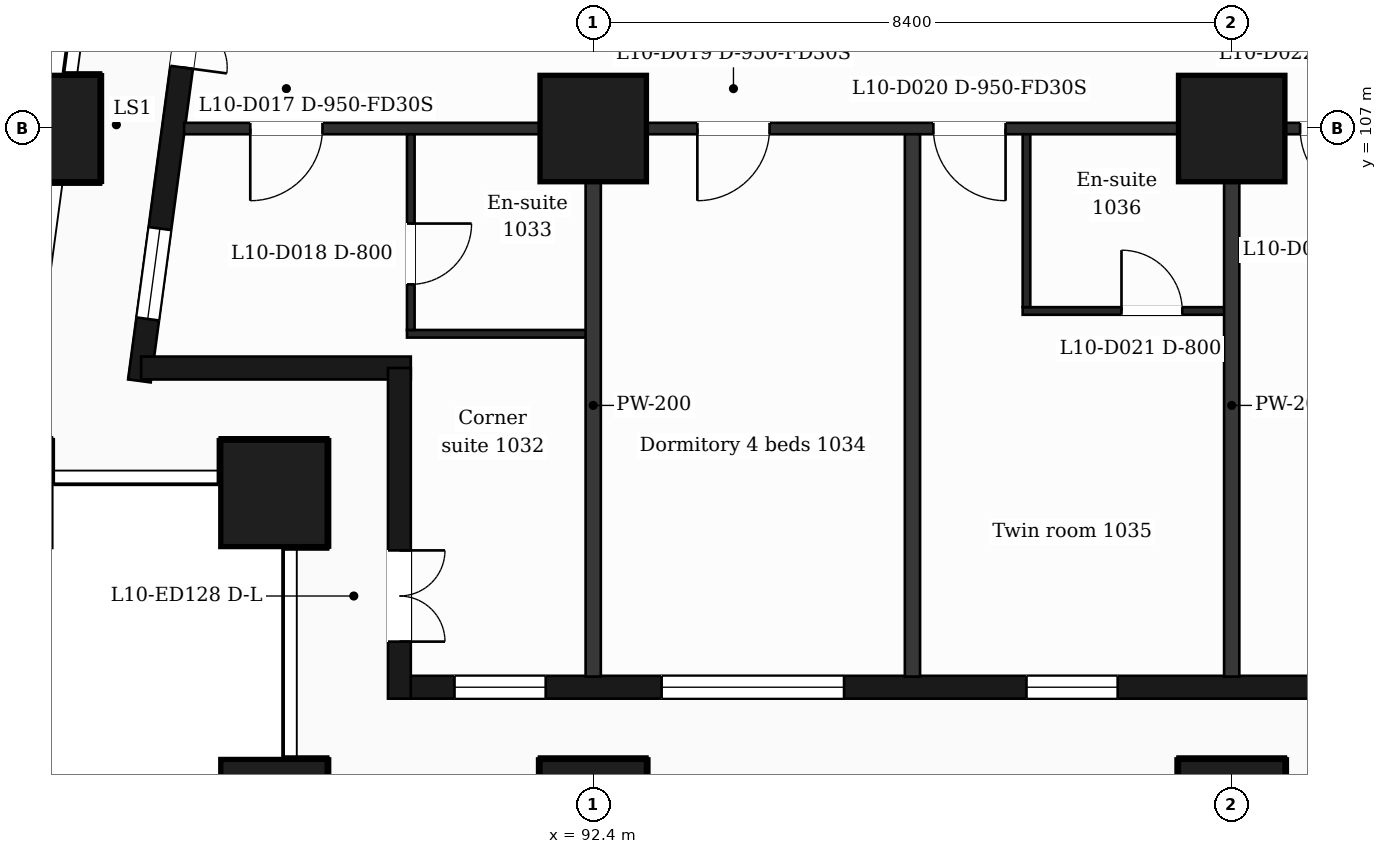
"""IFC4 building model, lengths in metres.
Left out: names, types, materials, properties, quantities, classifications, styles, units other than length and angle.
Written with IfcOpenShell. Run it as: python <this file> out.ifc"""

import sys

from ifc_helpers import new_model, si_unit, direction, frame, frame_2d, origin, origin_2d, place, context, subcontext, project, spatial, rectangle, extrude, element, fill, save


model = new_model("IFC4")
c1 = context("Model", 3, precision=1e-05, world=origin(), true_north=direction((0.0, 1.0)))
c2 = subcontext(c1, "Body", "Model", "MODEL_VIEW")
j1 = project(units=[si_unit("LENGTHUNIT", "METRE"), si_unit("PLANEANGLEUNIT", "RADIAN")], contexts=[c1])
p1 = place(None, origin())
s1 = spatial("IfcSite", under=j1, at=p1, CompositionType="ELEMENT")
p2 = place(p1, origin())
s2 = spatial("IfcBuilding", under=s1, at=p2, CompositionType="ELEMENT")
p3 = place(p2, frame((0.0, 0.0, 53.0)))
s3 = spatial("IfcBuildingStorey", under=s2, at=p3, CompositionType="ELEMENT", Elevation=53.0)
for number, where, z_axis, x_axis in (
    (1, (92.4, 98.0, 0.0), (0.0, 0.0, 1.0), (1.0, 0.0, 0.0)),
    (2, (100.8, 98.0, 0.0), (0.0, 0.0, 1.0), (1.0, 0.0, 0.0)),
    (3, (88.2, 98.0, 0.0), (0.0, 0.0, 1.0), (1.0, 0.0, 0.0)),
    (4, (88.2, 102.2, 0.0), (0.0, 0.0, 1.0), (1.0, 0.0, 0.0)),
    (5, (92.4, 107.0, 0.0), (0.0, 0.0, 1.0), (1.0, 0.0, 0.0)),
    (6, (100.8, 107.0, 0.0), (0.0, 0.0, 1.0), (1.0, 0.0, 0.0)),
    (7, (85.211, 107.0, 0.0), (0.0, 0.0, 1.0), (1.0, 0.0, 0.0)),
):
    element("IfcColumn", number, at=place(p3, frame(where, z_axis=z_axis, x_axis=x_axis)), inside=s3, PredefinedType="COLUMN", context=c2, shape_type="SweptSolid", body=[
        extrude(rectangle(XDim=1.4, YDim=1.4, at=origin_2d()), origin(), (0.0, 0.0, 1.0), 3.5),
    ])
p4 = place(p3, frame((89.85, 99.65, 0.0), z_axis=(0.0, 0.0, 1.0), x_axis=(1.0, 0.0, 0.0)))
e8 = element("IfcWall", 8, at=p4, inside=s3, PredefinedType="SOLIDWALL", context=c2, shape_type="SweptSolid", body=[
    extrude(rectangle(XDim=47.25, YDim=0.3, at=frame_2d((23.625, 0.0))), origin(), (0.0, 0.0, 1.0), 3.18),
])
p5 = place(p4, frame((0.725, 0.0, 0.9)))
e9 = element("IfcOpeningElement", 9, at=p5, cuts=e8, PredefinedType="OPENING", context=c2, shape_type="SweptSolid", body=[
    extrude(rectangle(XDim=1.2, YDim=2.1, at=frame_2d((0.6, 1.05))), frame((0.0, 0.16, 0.0), z_axis=(0.0, -1.0, 0.0), x_axis=(1.0, 0.0, 0.0)), (0.0, 0.0, 1.0), 0.32),
])
p6 = place(p4, frame((3.45, 0.0, 0.9)))
e10 = element("IfcOpeningElement", 10, at=p6, cuts=e8, PredefinedType="OPENING", context=c2, shape_type="SweptSolid", body=[
    extrude(rectangle(XDim=2.4, YDim=2.1, at=frame_2d((1.2, 1.05))), frame((0.0, 0.16, 0.0), z_axis=(0.0, -1.0, 0.0), x_axis=(1.0, 0.0, 0.0)), (0.0, 0.0, 1.0), 0.32),
])
p7 = place(p4, frame((8.25, 0.0, 0.9)))
e11 = element("IfcOpeningElement", 11, at=p7, cuts=e8, PredefinedType="OPENING", context=c2, shape_type="SweptSolid", body=[
    extrude(rectangle(XDim=1.2, YDim=2.1, at=frame_2d((0.6, 1.05))), frame((0.0, 0.16, 0.0), z_axis=(0.0, -1.0, 0.0), x_axis=(1.0, 0.0, 0.0)), (0.0, 0.0, 1.0), 0.32),
])
p8 = place(p4, frame((12.45, 0.0, 0.9)))
e12 = element("IfcOpeningElement", 12, at=p8, cuts=e8, PredefinedType="OPENING", context=c2, shape_type="SweptSolid", body=[
    extrude(rectangle(XDim=1.2, YDim=2.1, at=frame_2d((0.6, 1.05))), frame((0.0, 0.16, 0.0), z_axis=(0.0, -1.0, 0.0), x_axis=(1.0, 0.0, 0.0)), (0.0, 0.0, 1.0), 0.32),
])
p9 = place(p4, frame((16.05, 0.0, 0.9)))
e13 = element("IfcOpeningElement", 13, at=p9, cuts=e8, PredefinedType="OPENING", context=c2, shape_type="SweptSolid", body=[
    extrude(rectangle(XDim=2.4, YDim=2.1, at=frame_2d((1.2, 1.05))), frame((0.0, 0.16, 0.0), z_axis=(0.0, -1.0, 0.0), x_axis=(1.0, 0.0, 0.0)), (0.0, 0.0, 1.0), 0.32),
])
p10 = place(p4, frame((20.25, 0.0, 0.9)))
e14 = element("IfcOpeningElement", 14, at=p10, cuts=e8, PredefinedType="OPENING", context=c2, shape_type="SweptSolid", body=[
    extrude(rectangle(XDim=2.4, YDim=2.1, at=frame_2d((1.2, 1.05))), frame((0.0, 0.16, 0.0), z_axis=(0.0, -1.0, 0.0), x_axis=(1.0, 0.0, 0.0)), (0.0, 0.0, 1.0), 0.32),
])
p11 = place(p4, frame((25.05, 0.0, 0.0)))
e15 = element("IfcOpeningElement", 15, at=p11, cuts=e8, PredefinedType="OPENING", context=c2, shape_type="SweptSolid", body=[
    extrude(rectangle(XDim=1.2, YDim=2.4, at=frame_2d((0.6, 1.2))), frame((0.0, 0.16, 0.0), z_axis=(0.0, -1.0, 0.0), x_axis=(1.0, 0.0, 0.0)), (0.0, 0.0, 1.0), 0.32),
])
p12 = place(p4, frame((28.65, 0.0, 0.9)))
e16 = element("IfcOpeningElement", 16, at=p12, cuts=e8, PredefinedType="OPENING", context=c2, shape_type="SweptSolid", body=[
    extrude(rectangle(XDim=2.4, YDim=2.1, at=frame_2d((1.2, 1.05))), frame((0.0, 0.16, 0.0), z_axis=(0.0, -1.0, 0.0), x_axis=(1.0, 0.0, 0.0)), (0.0, 0.0, 1.0), 0.32),
])
p13 = place(p4, frame((32.85, 0.0, 0.9)))
e17 = element("IfcOpeningElement", 17, at=p13, cuts=e8, PredefinedType="OPENING", context=c2, shape_type="SweptSolid", body=[
    extrude(rectangle(XDim=2.4, YDim=2.1, at=frame_2d((1.2, 1.05))), frame((0.0, 0.16, 0.0), z_axis=(0.0, -1.0, 0.0), x_axis=(1.0, 0.0, 0.0)), (0.0, 0.0, 1.0), 0.32),
])
p14 = place(p4, frame((37.65, 0.0, 0.9)))
e18 = element("IfcOpeningElement", 18, at=p14, cuts=e8, PredefinedType="OPENING", context=c2, shape_type="SweptSolid", body=[
    extrude(rectangle(XDim=1.2, YDim=2.1, at=frame_2d((0.6, 1.05))), frame((0.0, 0.16, 0.0), z_axis=(0.0, -1.0, 0.0), x_axis=(1.0, 0.0, 0.0)), (0.0, 0.0, 1.0), 0.32),
])
p15 = place(p4, frame((41.85, 0.0, 0.9)))
e19 = element("IfcOpeningElement", 19, at=p15, cuts=e8, PredefinedType="OPENING", context=c2, shape_type="SweptSolid", body=[
    extrude(rectangle(XDim=1.2, YDim=2.1, at=frame_2d((0.6, 1.05))), frame((0.0, 0.16, 0.0), z_axis=(0.0, -1.0, 0.0), x_axis=(1.0, 0.0, 0.0)), (0.0, 0.0, 1.0), 0.32),
])
p16 = place(p4, frame((45.25, 0.0, 0.9)))
e20 = element("IfcOpeningElement", 20, at=p16, cuts=e8, PredefinedType="OPENING", context=c2, shape_type="SweptSolid", body=[
    extrude(rectangle(XDim=1.2, YDim=2.1, at=frame_2d((0.6, 1.05))), frame((0.0, 0.16, 0.0), z_axis=(0.0, -1.0, 0.0), x_axis=(1.0, 0.0, 0.0)), (0.0, 0.0, 1.0), 0.32),
])
p17 = place(p3, frame((87.334, 110.4, 0.0), z_axis=(0.0, 0.0, 1.0), x_axis=(-0.133437175554, -0.991057273915, 0.0)))
e21 = element("IfcWall", 21, at=p17, inside=s3, PredefinedType="SOLIDWALL", context=c2, shape_type="SweptSolid", body=[
    extrude(rectangle(XDim=6.781, YDim=0.3, at=frame_2d((3.39, 0.0))), origin(), (0.0, 0.0, 1.0), 3.18),
])
p18 = place(p17, frame((1.418, 0.0, 0.0)))
e22 = element("IfcOpeningElement", 22, at=p18, cuts=e21, PredefinedType="OPENING", context=c2, shape_type="SweptSolid", body=[
    extrude(rectangle(XDim=1.2, YDim=2.4, at=frame_2d((0.6, 1.2))), frame((0.0, 0.16, 0.0), z_axis=(0.0, -1.0, 0.0), x_axis=(1.0, 0.0, 0.0)), (0.0, 0.0, 1.0), 0.32),
])
p19 = place(p17, frame((4.758, 0.0, 0.9)))
e23 = element("IfcOpeningElement", 23, at=p19, cuts=e21, PredefinedType="OPENING", context=c2, shape_type="SweptSolid", body=[
    extrude(rectangle(XDim=1.2, YDim=2.1, at=frame_2d((0.6, 1.05))), frame((0.0, 0.16, 0.0), z_axis=(0.0, -1.0, 0.0), x_axis=(1.0, 0.0, 0.0)), (0.0, 0.0, 1.0), 0.32),
])
p20 = place(p3, frame((86.452, 103.85, 0.0), z_axis=(0.0, 0.0, 1.0), x_axis=(1.0, 0.0, 0.0)))
e24 = element("IfcWall", 24, at=p20, inside=s3, PredefinedType="SOLIDWALL", context=c2, shape_type="SweptSolid", body=[
    extrude(rectangle(XDim=3.548, YDim=0.3, at=frame_2d((1.774, 0.0))), origin(), (0.0, 0.0, 1.0), 3.18),
])
p21 = place(p3, frame((89.85, 103.85, 0.0), z_axis=(0.0, 0.0, 1.0), x_axis=(0.0, -1.0, 0.0)))
e25 = element("IfcWall", 25, at=p21, inside=s3, PredefinedType="SOLIDWALL", context=c2, shape_type="SweptSolid", body=[
    extrude(rectangle(XDim=4.35, YDim=0.3, at=frame_2d((2.175, 0.0))), origin(), (0.0, 0.0, 1.0), 3.18),
])
p22 = place(p21, frame((2.4, 0.0, 0.0)))
e26 = element("IfcOpeningElement", 26, at=p22, cuts=e25, PredefinedType="OPENING", context=c2, shape_type="SweptSolid", body=[
    extrude(rectangle(XDim=1.2, YDim=2.4, at=frame_2d((0.6, 1.2))), frame((0.0, 0.16, 0.0), z_axis=(0.0, -1.0, 0.0), x_axis=(1.0, 0.0, 0.0)), (0.0, 0.0, 1.0), 0.32),
])
p23 = place(p3, frame((89.95, 104.3, 0.0), z_axis=(0.0, 0.0, 1.0), x_axis=(1.0, 0.0, 0.0)))
e27 = element("IfcWall", 27, at=p23, inside=s3, PredefinedType="PARTITIONING", context=c2, shape_type="SweptSolid", body=[
    extrude(rectangle(XDim=2.45, YDim=0.1, at=frame_2d((1.225, 0.0))), origin(), (0.0, 0.0, 1.0), 3.18),
])
p24 = place(p3, frame((98.05, 104.6, 0.0), z_axis=(0.0, 0.0, 1.0), x_axis=(1.0, 0.0, 0.0)))
e28 = element("IfcWall", 28, at=p24, inside=s3, PredefinedType="PARTITIONING", context=c2, shape_type="SweptSolid", body=[
    extrude(rectangle(XDim=2.75, YDim=0.1, at=frame_2d((1.375, 0.0))), origin(), (0.0, 0.0, 1.0), 3.18),
])
p25 = place(p24, frame((1.3, 0.0, 0.0)))
e29 = element("IfcOpeningElement", 29, at=p25, cuts=e28, PredefinedType="OPENING", context=c2, shape_type="SweptSolid", body=[
    extrude(rectangle(XDim=0.8, YDim=2.1, at=frame_2d((0.4, 1.05))), frame((0.0, 0.06, 0.0), z_axis=(0.0, -1.0, 0.0), x_axis=(1.0, 0.0, 0.0)), (0.0, 0.0, 1.0), 0.12),
])
p26 = place(p3, frame((87.018, 107.0, 0.0), z_axis=(0.0, 0.0, 1.0), x_axis=(1.0, 0.0, 0.0)))
e30 = element("IfcWall", 30, at=p26, inside=s3, PredefinedType="PARTITIONING", context=c2, shape_type="SweptSolid", body=[
    extrude(rectangle(XDim=52.765, YDim=0.15, at=frame_2d((26.382, 0.0))), origin(), (0.0, 0.0, 1.0), 3.18),
])
p27 = place(p26, frame((0.87, 0.0, 0.0)))
e31 = element("IfcOpeningElement", 31, at=p27, cuts=e30, PredefinedType="OPENING", context=c2, shape_type="SweptSolid", body=[
    extrude(rectangle(XDim=0.95, YDim=2.1, at=frame_2d((0.475, 1.05))), frame((0.0, 0.085, 0.0), z_axis=(0.0, -1.0, 0.0), x_axis=(1.0, 0.0, 0.0)), (0.0, 0.0, 1.0), 0.17),
])
p28 = place(p26, frame((6.752, 0.0, 0.0)))
e32 = element("IfcOpeningElement", 32, at=p28, cuts=e30, PredefinedType="OPENING", context=c2, shape_type="SweptSolid", body=[
    extrude(rectangle(XDim=0.95, YDim=2.1, at=frame_2d((0.475, 1.05))), frame((0.0, 0.085, 0.0), z_axis=(0.0, -1.0, 0.0), x_axis=(1.0, 0.0, 0.0)), (0.0, 0.0, 1.0), 0.17),
])
p29 = place(p26, frame((9.857, 0.0, 0.0)))
e33 = element("IfcOpeningElement", 33, at=p29, cuts=e30, PredefinedType="OPENING", context=c2, shape_type="SweptSolid", body=[
    extrude(rectangle(XDim=0.95, YDim=2.1, at=frame_2d((0.475, 1.05))), frame((0.0, 0.085, 0.0), z_axis=(0.0, -1.0, 0.0), x_axis=(1.0, 0.0, 0.0)), (0.0, 0.0, 1.0), 0.17),
])
p30 = place(p26, frame((14.682, 0.0, 0.0)))
e34 = element("IfcOpeningElement", 34, at=p30, cuts=e30, PredefinedType="OPENING", context=c2, shape_type="SweptSolid", body=[
    extrude(rectangle(XDim=0.95, YDim=2.1, at=frame_2d((0.475, 1.05))), frame((0.0, 0.085, 0.0), z_axis=(0.0, -1.0, 0.0), x_axis=(1.0, 0.0, 0.0)), (0.0, 0.0, 1.0), 0.17),
])
p31 = place(p26, frame((19.862, 0.0, 0.0)))
e35 = element("IfcOpeningElement", 35, at=p31, cuts=e30, PredefinedType="OPENING", context=c2, shape_type="SweptSolid", body=[
    extrude(rectangle(XDim=0.95, YDim=2.1, at=frame_2d((0.475, 1.05))), frame((0.0, 0.085, 0.0), z_axis=(0.0, -1.0, 0.0), x_axis=(1.0, 0.0, 0.0)), (0.0, 0.0, 1.0), 0.17),
])
p32 = place(p26, frame((25.157, 0.0, 0.0)))
e36 = element("IfcOpeningElement", 36, at=p32, cuts=e30, PredefinedType="OPENING", context=c2, shape_type="SweptSolid", body=[
    extrude(rectangle(XDim=0.95, YDim=2.1, at=frame_2d((0.475, 1.05))), frame((0.0, 0.085, 0.0), z_axis=(0.0, -1.0, 0.0), x_axis=(1.0, 0.0, 0.0)), (0.0, 0.0, 1.0), 0.17),
])
p33 = place(p26, frame((28.262, 0.0, 0.0)))
e37 = element("IfcOpeningElement", 37, at=p33, cuts=e30, PredefinedType="OPENING", context=c2, shape_type="SweptSolid", body=[
    extrude(rectangle(XDim=0.95, YDim=2.1, at=frame_2d((0.475, 1.05))), frame((0.0, 0.085, 0.0), z_axis=(0.0, -1.0, 0.0), x_axis=(1.0, 0.0, 0.0)), (0.0, 0.0, 1.0), 0.17),
])
p34 = place(p26, frame((32.207, 0.0, 0.0)))
e38 = element("IfcOpeningElement", 38, at=p34, cuts=e30, PredefinedType="OPENING", context=c2, shape_type="SweptSolid", body=[
    extrude(rectangle(XDim=0.95, YDim=2.1, at=frame_2d((0.475, 1.05))), frame((0.0, 0.085, 0.0), z_axis=(0.0, -1.0, 0.0), x_axis=(1.0, 0.0, 0.0)), (0.0, 0.0, 1.0), 0.17),
])
p35 = place(p26, frame((37.094, 0.0, 0.0)))
e39 = element("IfcOpeningElement", 39, at=p35, cuts=e30, PredefinedType="OPENING", context=c2, shape_type="SweptSolid", body=[
    extrude(rectangle(XDim=0.95, YDim=2.1, at=frame_2d((0.475, 1.05))), frame((0.0, 0.085, 0.0), z_axis=(0.0, -1.0, 0.0), x_axis=(1.0, 0.0, 0.0)), (0.0, 0.0, 1.0), 0.17),
])
p36 = place(p26, frame((43.045, 0.0, 0.0)))
e40 = element("IfcOpeningElement", 40, at=p36, cuts=e30, PredefinedType="OPENING", context=c2, shape_type="SweptSolid", body=[
    extrude(rectangle(XDim=0.95, YDim=2.1, at=frame_2d((0.475, 1.05))), frame((0.0, 0.085, 0.0), z_axis=(0.0, -1.0, 0.0), x_axis=(1.0, 0.0, 0.0)), (0.0, 0.0, 1.0), 0.17),
])
p37 = place(p26, frame((49.285, 0.0, 0.0)))
e41 = element("IfcOpeningElement", 41, at=p37, cuts=e30, PredefinedType="OPENING", context=c2, shape_type="SweptSolid", body=[
    extrude(rectangle(XDim=0.95, YDim=2.1, at=frame_2d((0.475, 1.05))), frame((0.0, 0.085, 0.0), z_axis=(0.0, -1.0, 0.0), x_axis=(1.0, 0.0, 0.0)), (0.0, 0.0, 1.0), 0.17),
])
p38 = place(p3, frame((90.0, 104.35, 0.0), z_axis=(0.0, 0.0, 1.0), x_axis=(0.0, 1.0, 0.0)))
e42 = element("IfcWall", 42, at=p38, inside=s3, PredefinedType="PARTITIONING", context=c2, shape_type="SweptSolid", body=[
    extrude(rectangle(XDim=2.575, YDim=0.1, at=frame_2d((1.288, 0.0))), origin(), (0.0, 0.0, 1.0), 3.18),
])
p39 = place(p38, frame((0.6, 0.0, 0.0)))
e43 = element("IfcOpeningElement", 43, at=p39, cuts=e42, PredefinedType="OPENING", context=c2, shape_type="SweptSolid", body=[
    extrude(rectangle(XDim=0.8, YDim=2.1, at=frame_2d((0.4, 1.05))), frame((0.0, 0.06, 0.0), z_axis=(0.0, -1.0, 0.0), x_axis=(1.0, 0.0, 0.0)), (0.0, 0.0, 1.0), 0.12),
])
for number, where, z_axis, x_axis in (
    (44, (92.4, 99.79, 0.0), (0.0, 0.0, 1.0), (0.0, 1.0, 0.0)),
    (45, (96.6, 99.79, 0.0), (0.0, 0.0, 1.0), (0.0, 1.0, 0.0)),
):
    element("IfcWall", number, at=place(p3, frame(where, z_axis=z_axis, x_axis=x_axis)), inside=s3, PredefinedType="PARTITIONING", context=c2, shape_type="SweptSolid", body=[
        extrude(rectangle(XDim=7.135, YDim=0.2, at=frame_2d((3.567, 0.0))), origin(), (0.0, 0.0, 1.0), 3.18),
    ])
p40 = place(p3, frame((98.1, 104.65, 0.0), z_axis=(0.0, 0.0, 1.0), x_axis=(0.0, 1.0, 0.0)))
e46 = element("IfcWall", 46, at=p40, inside=s3, PredefinedType="PARTITIONING", context=c2, shape_type="SweptSolid", body=[
    extrude(rectangle(XDim=2.275, YDim=0.1, at=frame_2d((1.138, 0.0))), origin(), (0.0, 0.0, 1.0), 3.18),
])
p41 = place(p3, frame((100.8, 99.79, 0.0), z_axis=(0.0, 0.0, 1.0), x_axis=(0.0, 1.0, 0.0)))
e47 = element("IfcWall", 47, at=p41, inside=s3, PredefinedType="PARTITIONING", context=c2, shape_type="SweptSolid", body=[
    extrude(rectangle(XDim=7.135, YDim=0.2, at=frame_2d((3.567, 0.0))), origin(), (0.0, 0.0, 1.0), 3.18),
])
p42 = place(p5, origin())
e48 = element("IfcWindow", 48, at=p42, inside=s3, PartitioningType="SINGLE_PANEL", PredefinedType="WINDOW", context=c2, shape_type="SweptSolid", body=[
    extrude(rectangle(XDim=1.2, YDim=2.1, at=frame_2d((0.6, 1.05))), frame((0.0, 0.03, 0.0), z_axis=(0.0, -1.0, 0.0), x_axis=(1.0, 0.0, 0.0)), (0.0, 0.0, 1.0), 0.06),
])
fill(e9, e48)
p43 = place(p6, origin())
e49 = element("IfcWindow", 49, at=p43, inside=s3, PartitioningType="SINGLE_PANEL", PredefinedType="WINDOW", context=c2, shape_type="SweptSolid", body=[
    extrude(rectangle(XDim=2.4, YDim=2.1, at=frame_2d((1.2, 1.05))), frame((0.0, 0.03, 0.0), z_axis=(0.0, -1.0, 0.0), x_axis=(1.0, 0.0, 0.0)), (0.0, 0.0, 1.0), 0.06),
])
fill(e10, e49)
p44 = place(p7, origin())
e50 = element("IfcWindow", 50, at=p44, inside=s3, PartitioningType="SINGLE_PANEL", PredefinedType="WINDOW", context=c2, shape_type="SweptSolid", body=[
    extrude(rectangle(XDim=1.2, YDim=2.1, at=frame_2d((0.6, 1.05))), frame((0.0, 0.03, 0.0), z_axis=(0.0, -1.0, 0.0), x_axis=(1.0, 0.0, 0.0)), (0.0, 0.0, 1.0), 0.06),
])
fill(e11, e50)
p45 = place(p18, origin())
e51 = element("IfcDoor", 51, at=p45, inside=s3, OperationType="DOUBLE_DOOR_SINGLE_SWING", PredefinedType="DOOR", context=c2, shape_type="SweptSolid", body=[
    extrude(rectangle(XDim=1.2, YDim=2.4, at=frame_2d((0.6, 1.2))), frame((0.0, 0.025, 0.0), z_axis=(0.0, -1.0, 0.0), x_axis=(1.0, 0.0, 0.0)), (0.0, 0.0, 1.0), 0.05),
])
fill(e22, e51)
p46 = place(p19, origin())
e52 = element("IfcWindow", 52, at=p46, inside=s3, PartitioningType="SINGLE_PANEL", PredefinedType="WINDOW", context=c2, shape_type="SweptSolid", body=[
    extrude(rectangle(XDim=1.2, YDim=2.1, at=frame_2d((0.6, 1.05))), frame((0.0, 0.03, 0.0), z_axis=(0.0, -1.0, 0.0), x_axis=(1.0, 0.0, 0.0)), (0.0, 0.0, 1.0), 0.06),
])
fill(e23, e52)
p47 = place(p22, origin())
e53 = element("IfcDoor", 53, at=p47, inside=s3, OperationType="DOUBLE_DOOR_SINGLE_SWING", PredefinedType="DOOR", context=c2, shape_type="SweptSolid", body=[
    extrude(rectangle(XDim=1.2, YDim=2.4, at=frame_2d((0.6, 1.2))), frame((0.0, 0.025, 0.0), z_axis=(0.0, -1.0, 0.0), x_axis=(1.0, 0.0, 0.0)), (0.0, 0.0, 1.0), 0.05),
])
fill(e26, e53)
p48 = place(p27, origin())
e54 = element("IfcDoor", 54, at=p48, inside=s3, OperationType="SINGLE_SWING_LEFT", PredefinedType="DOOR", context=c2, shape_type="SweptSolid", body=[
    extrude(rectangle(XDim=0.95, YDim=2.1, at=frame_2d((0.475, 1.05))), frame((0.0, 0.025, 0.0), z_axis=(0.0, -1.0, 0.0), x_axis=(1.0, 0.0, 0.0)), (0.0, 0.0, 1.0), 0.05),
])
fill(e31, e54)
p49 = place(p39, origin())
e55 = element("IfcDoor", 55, at=p49, inside=s3, OperationType="SINGLE_SWING_RIGHT", PredefinedType="DOOR", context=c2, shape_type="SweptSolid", body=[
    extrude(rectangle(XDim=0.8, YDim=2.1, at=frame_2d((0.4, 1.05))), frame((0.0, 0.025, 0.0), z_axis=(0.0, -1.0, 0.0), x_axis=(1.0, 0.0, 0.0)), (0.0, 0.0, 1.0), 0.05),
])
fill(e43, e55)
p50 = place(p28, origin())
e56 = element("IfcDoor", 56, at=p50, inside=s3, OperationType="SINGLE_SWING_LEFT", PredefinedType="DOOR", context=c2, shape_type="SweptSolid", body=[
    extrude(rectangle(XDim=0.95, YDim=2.1, at=frame_2d((0.475, 1.05))), frame((0.0, 0.025, 0.0), z_axis=(0.0, -1.0, 0.0), x_axis=(1.0, 0.0, 0.0)), (0.0, 0.0, 1.0), 0.05),
])
fill(e32, e56)
p51 = place(p29, origin())
e57 = element("IfcDoor", 57, at=p51, inside=s3, OperationType="SINGLE_SWING_RIGHT", PredefinedType="DOOR", context=c2, shape_type="SweptSolid", body=[
    extrude(rectangle(XDim=0.95, YDim=2.1, at=frame_2d((0.475, 1.05))), frame((0.0, 0.025, 0.0), z_axis=(0.0, -1.0, 0.0), x_axis=(1.0, 0.0, 0.0)), (0.0, 0.0, 1.0), 0.05),
])
fill(e33, e57)
p52 = place(p25, origin())
e58 = element("IfcDoor", 58, at=p52, inside=s3, OperationType="SINGLE_SWING_LEFT", PredefinedType="DOOR", context=c2, shape_type="SweptSolid", body=[
    extrude(rectangle(XDim=0.8, YDim=2.1, at=frame_2d((0.4, 1.05))), frame((0.0, 0.025, 0.0), z_axis=(0.0, -1.0, 0.0), x_axis=(1.0, 0.0, 0.0)), (0.0, 0.0, 1.0), 0.05),
])
fill(e29, e58)
p53 = place(p30, origin())
e59 = element("IfcDoor", 59, at=p53, inside=s3, OperationType="SINGLE_SWING_RIGHT", PredefinedType="DOOR", context=c2, shape_type="SweptSolid", body=[
    extrude(rectangle(XDim=0.95, YDim=2.1, at=frame_2d((0.475, 1.05))), frame((0.0, 0.025, 0.0), z_axis=(0.0, -1.0, 0.0), x_axis=(1.0, 0.0, 0.0)), (0.0, 0.0, 1.0), 0.05),
])
fill(e34, e59)
save(model, sys.argv[1])
